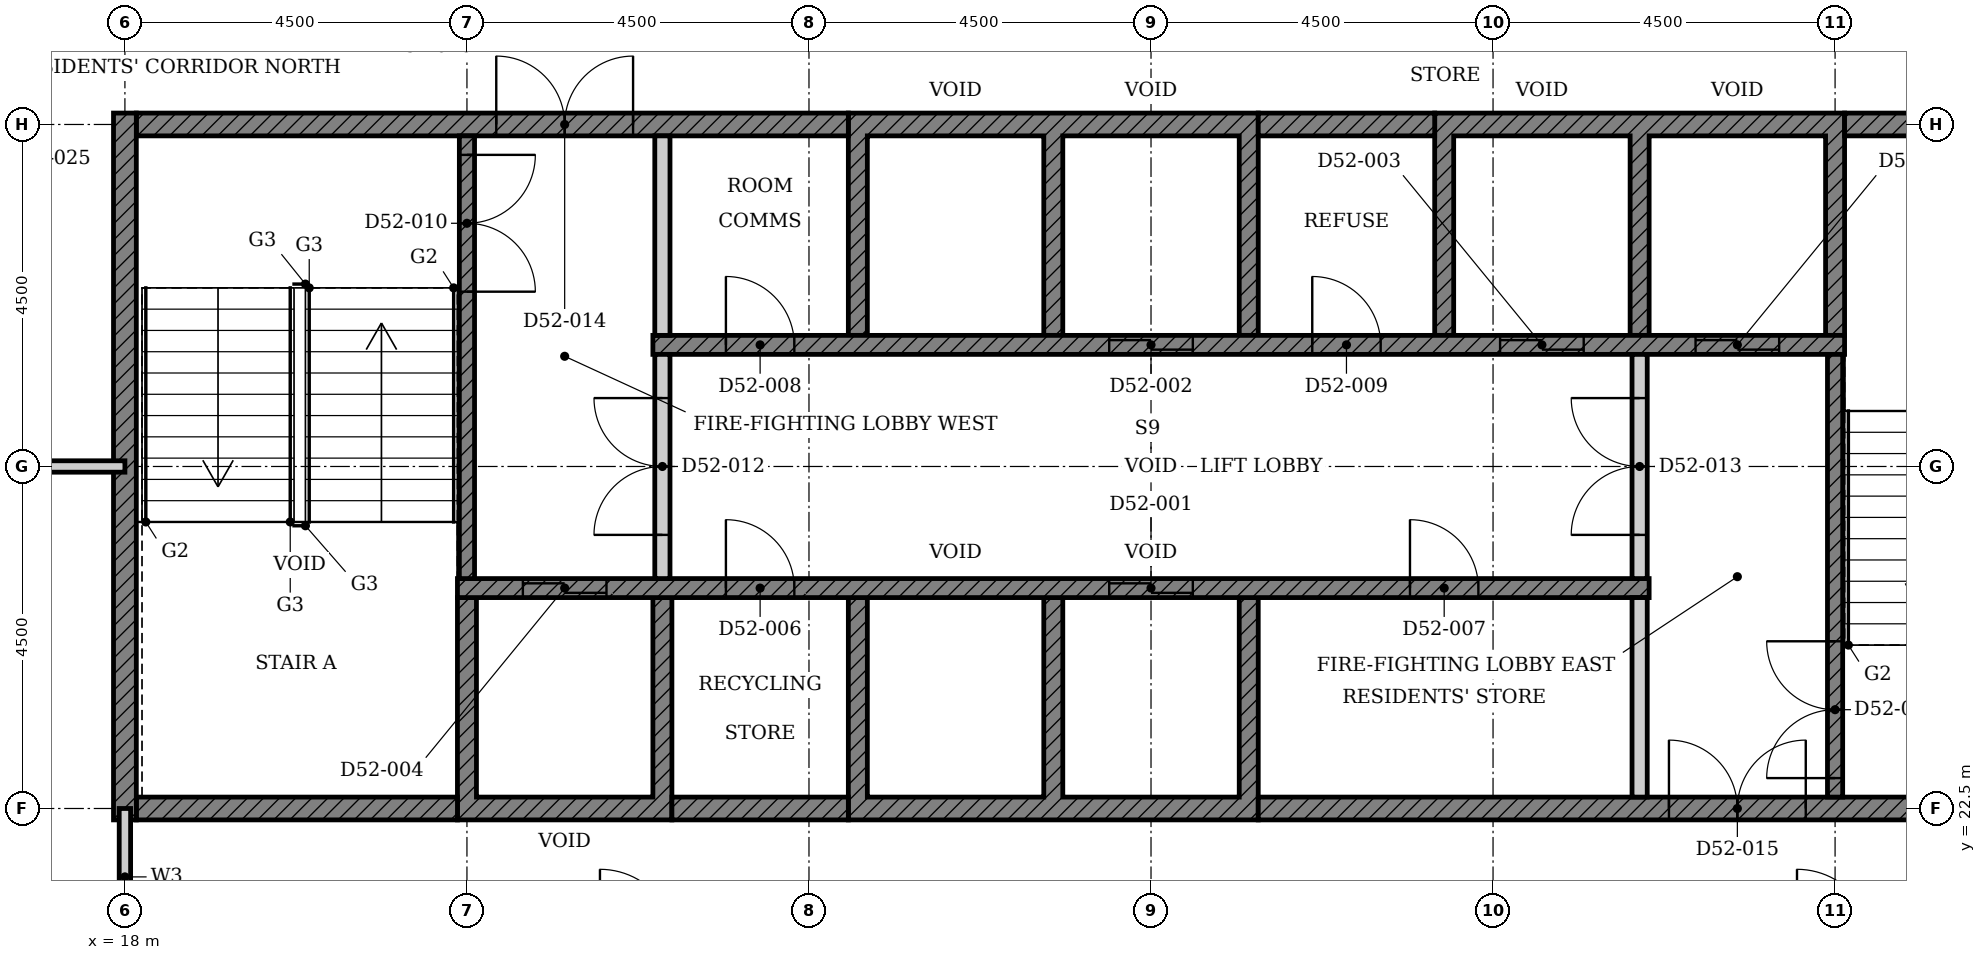
"""IFC4 building model, lengths in metres.
Left out: names, types, materials, properties, quantities, classifications, styles, units other than length and angle.
Written with IfcOpenShell. Run it as: python <this file> out.ifc"""

import sys

from ifc_helpers import new_model, si_unit, direction, frame, frame_2d, origin, place, context, subcontext, project, spatial, polyline, rectangle, outline, extrude, element, fill, save


model = new_model("IFC4")
c1 = context("Model", 3, precision=1e-05, world=origin(), true_north=direction((0.0, 1.0)))
c2 = subcontext(c1, "Body", "Model", "MODEL_VIEW")
j1 = project(units=[si_unit("LENGTHUNIT", "METRE"), si_unit("PLANEANGLEUNIT", "RADIAN")], contexts=[c1])
p1 = place(None, origin())
s1 = spatial("IfcSite", under=j1, at=p1, CompositionType="ELEMENT")
p2 = place(p1, origin())
s2 = spatial("IfcBuilding", under=s1, at=p2, CompositionType="ELEMENT")
p3 = place(p2, frame((0.0, 0.0, 207.2)))
s3 = spatial("IfcBuildingStorey", under=s2, at=p3, CompositionType="ELEMENT", Elevation=207.2)
p4 = place(p3, origin())
e1 = element("IfcWall", 1, at=p4, inside=s3, PredefinedType="SHEAR", context=c2, shape_type="SweptSolid", body=[
    extrude(outline(polyline([(22.375, 22.35), (25.197, 22.35), (25.197, 25.275), (24.947, 25.275), (24.947, 22.65), (22.625, 22.65), (22.625, 25.275), (22.375, 25.275), (22.375, 22.35)])), origin(), (0.0, 0.0, 1.0), 3.4),
])
p5 = place(p3, origin())
e2 = element("IfcWall", 2, at=p5, inside=s3, PredefinedType="SHEAR", context=c2, shape_type="SweptSolid", body=[
    extrude(outline(polyline([(27.518, 22.35), (32.911, 22.35), (32.911, 25.275), (32.661, 25.275), (32.661, 22.65), (30.339, 22.65), (30.339, 25.275), (30.089, 25.275), (30.089, 22.65), (27.768, 22.65), (27.768, 25.275), (27.518, 25.275), (27.518, 22.35)])), origin(), (0.0, 0.0, 1.0), 3.4),
])
p6 = place(p3, origin())
e3 = element("IfcWall", 3, at=p6, inside=s3, PredefinedType="SHEAR", context=c2, shape_type="SweptSolid", body=[
    extrude(outline(polyline([(27.518, 28.725), (27.768, 28.725), (27.768, 31.35), (30.089, 31.35), (30.089, 28.725), (30.339, 28.725), (30.339, 31.35), (32.661, 31.35), (32.661, 28.725), (32.911, 28.725), (32.911, 31.65), (27.518, 31.65), (27.518, 28.725)])), origin(), (0.0, 0.0, 1.0), 3.4),
])
p7 = place(p3, origin())
e4 = element("IfcWall", 4, at=p7, inside=s3, PredefinedType="SHEAR", context=c2, shape_type="SweptSolid", body=[
    extrude(outline(polyline([(35.232, 28.725), (35.482, 28.725), (35.482, 31.35), (37.803, 31.35), (37.803, 28.725), (38.053, 28.725), (38.053, 31.35), (40.375, 31.35), (40.375, 28.725), (40.625, 28.725), (40.625, 31.65), (35.232, 31.65), (35.232, 28.725)])), origin(), (0.0, 0.0, 1.0), 3.4),
])
p8 = place(p3, frame((18.15, 22.5, 0.0), z_axis=(0.0, 0.0, 1.0), x_axis=(1.0, 0.0, 0.0)))
e5 = element("IfcWall", 5, at=p8, inside=s3, PredefinedType="SHEAR", context=c2, shape_type="SweptSolid", body=[
    extrude(rectangle(XDim=4.225, YDim=0.3, at=frame_2d((2.113, 0.0))), origin(), (0.0, 0.0, 1.0), 3.4),
])
p9 = place(p3, frame((25.197, 22.5, 0.0), z_axis=(0.0, 0.0, 1.0), x_axis=(1.0, 0.0, 0.0)))
e6 = element("IfcWall", 6, at=p9, inside=s3, PredefinedType="SHEAR", context=c2, shape_type="SweptSolid", body=[
    extrude(rectangle(XDim=2.321, YDim=0.3, at=frame_2d((1.161, 0.0))), origin(), (0.0, 0.0, 1.0), 3.4),
])
p10 = place(p3, frame((32.911, 22.5, 0.0), z_axis=(0.0, 0.0, 1.0), x_axis=(1.0, 0.0, 0.0)))
e7 = element("IfcWall", 7, at=p10, inside=s3, PredefinedType="SHEAR", context=c2, shape_type="SweptSolid", body=[
    extrude(rectangle(XDim=11.939, YDim=0.3, at=frame_2d((5.97, 0.0))), origin(), (0.0, 0.0, 1.0), 3.4),
])
p11 = place(p10, frame((5.404, 0.0, 0.0)))
e8 = element("IfcOpeningElement", 8, at=p11, cuts=e7, PredefinedType="OPENING", context=c2, shape_type="SweptSolid", body=[
    extrude(rectangle(XDim=1.8, YDim=2.1, at=frame_2d((0.9, 1.05))), frame((0.0, 0.16, 0.0), z_axis=(0.0, -1.0, 0.0), x_axis=(1.0, 0.0, 0.0)), (0.0, 0.0, 1.0), 0.32),
])
p12 = place(p3, frame((18.15, 31.5, 0.0), z_axis=(0.0, 0.0, 1.0), x_axis=(1.0, 0.0, 0.0)))
e9 = element("IfcWall", 9, at=p12, inside=s3, PredefinedType="SHEAR", context=c2, shape_type="SweptSolid", body=[
    extrude(rectangle(XDim=9.368, YDim=0.3, at=frame_2d((4.684, 0.0))), origin(), (0.0, 0.0, 1.0), 3.4),
])
p13 = place(p12, frame((4.736, 0.0, 0.0)))
e10 = element("IfcOpeningElement", 10, at=p13, cuts=e9, PredefinedType="OPENING", context=c2, shape_type="SweptSolid", body=[
    extrude(rectangle(XDim=1.8, YDim=2.1, at=frame_2d((0.9, 1.05))), frame((0.0, 0.16, 0.0), z_axis=(0.0, -1.0, 0.0), x_axis=(1.0, 0.0, 0.0)), (0.0, 0.0, 1.0), 0.32),
])
p14 = place(p3, frame((32.911, 31.5, 0.0), z_axis=(0.0, 0.0, 1.0), x_axis=(1.0, 0.0, 0.0)))
e11 = element("IfcWall", 11, at=p14, inside=s3, PredefinedType="SHEAR", context=c2, shape_type="SweptSolid", body=[
    extrude(rectangle(XDim=2.322, YDim=0.3, at=frame_2d((1.161, 0.0))), origin(), (0.0, 0.0, 1.0), 3.4),
])
p15 = place(p3, frame((40.625, 31.5, 0.0), z_axis=(0.0, 0.0, 1.0), x_axis=(1.0, 0.0, 0.0)))
e12 = element("IfcWall", 12, at=p15, inside=s3, PredefinedType="SHEAR", context=c2, shape_type="SweptSolid", body=[
    extrude(rectangle(XDim=4.225, YDim=0.3, at=frame_2d((2.113, 0.0))), origin(), (0.0, 0.0, 1.0), 3.4),
])
p16 = place(p3, frame((18.0, 22.35, 0.0), z_axis=(0.0, 0.0, 1.0), x_axis=(0.0, 1.0, 0.0)))
e13 = element("IfcWall", 13, at=p16, inside=s3, PredefinedType="SHEAR", context=c2, shape_type="SweptSolid", body=[
    extrude(rectangle(XDim=9.3, YDim=0.3, at=frame_2d((4.65, 0.0))), origin(), (0.0, 0.0, 1.0), 3.4),
])
p17 = place(p3, frame((22.375, 25.4, 0.0), z_axis=(0.0, 0.0, 1.0), x_axis=(1.0, 0.0, 0.0)))
e14 = element("IfcWall", 14, at=p17, inside=s3, PredefinedType="SHEAR", context=c2, shape_type="SweptSolid", body=[
    extrude(rectangle(XDim=15.678, YDim=0.25, at=frame_2d((7.839, 0.0))), origin(), (0.0, 0.0, 1.0), 3.4),
])
p18 = place(p17, frame((8.575, 0.0, 0.0)))
e15 = element("IfcOpeningElement", 15, at=p18, cuts=e14, PredefinedType="OPENING", context=c2, shape_type="SweptSolid", body=[
    extrude(rectangle(XDim=1.1, YDim=2.1, at=frame_2d((0.55, 1.05))), frame((0.0, 0.135, 0.0), z_axis=(0.0, -1.0, 0.0), x_axis=(1.0, 0.0, 0.0)), (0.0, 0.0, 1.0), 0.27),
])
p19 = place(p17, frame((0.861, 0.0, 0.0)))
e16 = element("IfcOpeningElement", 16, at=p19, cuts=e14, PredefinedType="OPENING", context=c2, shape_type="SweptSolid", body=[
    extrude(rectangle(XDim=1.1, YDim=2.1, at=frame_2d((0.55, 1.05))), frame((0.0, 0.135, 0.0), z_axis=(0.0, -1.0, 0.0), x_axis=(1.0, 0.0, 0.0)), (0.0, 0.0, 1.0), 0.27),
])
p20 = place(p17, frame((3.532, 0.0, 0.0)))
e17 = element("IfcOpeningElement", 17, at=p20, cuts=e14, PredefinedType="OPENING", context=c2, shape_type="SweptSolid", body=[
    extrude(rectangle(XDim=0.9, YDim=2.1, at=frame_2d((0.45, 1.05))), frame((0.0, 0.135, 0.0), z_axis=(0.0, -1.0, 0.0), x_axis=(1.0, 0.0, 0.0)), (0.0, 0.0, 1.0), 0.27),
])
p21 = place(p17, frame((12.532, 0.0, 0.0)))
e18 = element("IfcOpeningElement", 18, at=p21, cuts=e14, PredefinedType="OPENING", context=c2, shape_type="SweptSolid", body=[
    extrude(rectangle(XDim=0.9, YDim=2.1, at=frame_2d((0.45, 1.05))), frame((0.0, 0.135, 0.0), z_axis=(0.0, -1.0, 0.0), x_axis=(1.0, 0.0, 0.0)), (0.0, 0.0, 1.0), 0.27),
])
p22 = place(p3, frame((24.947, 28.6, 0.0), z_axis=(0.0, 0.0, 1.0), x_axis=(1.0, 0.0, 0.0)))
e19 = element("IfcWall", 19, at=p22, inside=s3, PredefinedType="SHEAR", context=c2, shape_type="SweptSolid", body=[
    extrude(rectangle(XDim=15.678, YDim=0.25, at=frame_2d((7.839, 0.0))), origin(), (0.0, 0.0, 1.0), 3.4),
])
p23 = place(p22, frame((6.004, 0.0, 0.0)))
e20 = element("IfcOpeningElement", 20, at=p23, cuts=e19, PredefinedType="OPENING", context=c2, shape_type="SweptSolid", body=[
    extrude(rectangle(XDim=1.1, YDim=2.1, at=frame_2d((0.55, 1.05))), frame((0.0, 0.135, 0.0), z_axis=(0.0, -1.0, 0.0), x_axis=(1.0, 0.0, 0.0)), (0.0, 0.0, 1.0), 0.27),
])
p24 = place(p22, frame((11.146, 0.0, 0.0)))
e21 = element("IfcOpeningElement", 21, at=p24, cuts=e19, PredefinedType="OPENING", context=c2, shape_type="SweptSolid", body=[
    extrude(rectangle(XDim=1.1, YDim=2.1, at=frame_2d((0.55, 1.05))), frame((0.0, 0.135, 0.0), z_axis=(0.0, -1.0, 0.0), x_axis=(1.0, 0.0, 0.0)), (0.0, 0.0, 1.0), 0.27),
])
p25 = place(p22, frame((13.718, 0.0, 0.0)))
e22 = element("IfcOpeningElement", 22, at=p25, cuts=e19, PredefinedType="OPENING", context=c2, shape_type="SweptSolid", body=[
    extrude(rectangle(XDim=1.1, YDim=2.1, at=frame_2d((0.55, 1.05))), frame((0.0, 0.135, 0.0), z_axis=(0.0, -1.0, 0.0), x_axis=(1.0, 0.0, 0.0)), (0.0, 0.0, 1.0), 0.27),
])
p26 = place(p22, frame((0.961, 0.0, 0.0)))
e23 = element("IfcOpeningElement", 23, at=p26, cuts=e19, PredefinedType="OPENING", context=c2, shape_type="SweptSolid", body=[
    extrude(rectangle(XDim=0.9, YDim=2.1, at=frame_2d((0.45, 1.05))), frame((0.0, 0.135, 0.0), z_axis=(0.0, -1.0, 0.0), x_axis=(1.0, 0.0, 0.0)), (0.0, 0.0, 1.0), 0.27),
])
p27 = place(p22, frame((8.675, 0.0, 0.0)))
e24 = element("IfcOpeningElement", 24, at=p27, cuts=e19, PredefinedType="OPENING", context=c2, shape_type="SweptSolid", body=[
    extrude(rectangle(XDim=0.9, YDim=2.1, at=frame_2d((0.45, 1.05))), frame((0.0, 0.135, 0.0), z_axis=(0.0, -1.0, 0.0), x_axis=(1.0, 0.0, 0.0)), (0.0, 0.0, 1.0), 0.27),
])
for number, where, z_axis, x_axis in (
    (25, (37.928, 22.65, 0.0), (0.0, 0.0, 1.0), (0.0, 1.0, 0.0)),
    (26, (25.072, 28.725, 0.0), (0.0, 0.0, 1.0), (0.0, 1.0, 0.0)),
):
    element("IfcWall", number, at=place(p3, frame(where, z_axis=z_axis, x_axis=x_axis)), inside=s3, PredefinedType="PARTITIONING", context=c2, shape_type="SweptSolid", body=[
        extrude(rectangle(XDim=2.625, YDim=0.2, at=frame_2d((1.312, 0.0))), origin(), (0.0, 0.0, 1.0), 3.4),
    ])
p28 = place(p3, frame((22.5, 31.35, 0.0), z_axis=(0.0, 0.0, 1.0), x_axis=(0.0, -1.0, 0.0)))
e27 = element("IfcWall", 27, at=p28, inside=s3, PredefinedType="SHEAR", context=c2, shape_type="SweptSolid", body=[
    extrude(rectangle(XDim=5.825, YDim=0.2, at=frame_2d((2.913, 0.0))), origin(), (0.0, 0.0, 1.0), 3.4),
])
p29 = place(p28, frame((0.25, 0.0, 0.0)))
e28 = element("IfcOpeningElement", 28, at=p29, cuts=e27, PredefinedType="OPENING", context=c2, shape_type="SweptSolid", body=[
    extrude(rectangle(XDim=1.8, YDim=2.1, at=frame_2d((0.9, 1.05))), frame((0.0, 0.11, 0.0), z_axis=(0.0, -1.0, 0.0), x_axis=(1.0, 0.0, 0.0)), (0.0, 0.0, 1.0), 0.22),
])
p30 = place(p3, frame((40.5, 22.65, 0.0), z_axis=(0.0, 0.0, 1.0), x_axis=(0.0, 1.0, 0.0)))
e29 = element("IfcWall", 29, at=p30, inside=s3, PredefinedType="SHEAR", context=c2, shape_type="SweptSolid", body=[
    extrude(rectangle(XDim=5.825, YDim=0.2, at=frame_2d((2.913, 0.0))), origin(), (0.0, 0.0, 1.0), 3.4),
])
p31 = place(p30, frame((0.25, 0.0, 0.0)))
e30 = element("IfcOpeningElement", 30, at=p31, cuts=e29, PredefinedType="OPENING", context=c2, shape_type="SweptSolid", body=[
    extrude(rectangle(XDim=1.8, YDim=2.1, at=frame_2d((0.9, 1.05))), frame((0.0, 0.11, 0.0), z_axis=(0.0, -1.0, 0.0), x_axis=(1.0, 0.0, 0.0)), (0.0, 0.0, 1.0), 0.22),
])
p32 = place(p3, frame((25.072, 25.525, 0.0), z_axis=(0.0, 0.0, 1.0), x_axis=(0.0, 1.0, 0.0)))
e31 = element("IfcWall", 31, at=p32, inside=s3, PredefinedType="PARTITIONING", context=c2, shape_type="SweptSolid", body=[
    extrude(rectangle(XDim=2.95, YDim=0.2, at=frame_2d((1.475, 0.0))), origin(), (0.0, 0.0, 1.0), 3.4),
])
p33 = place(p32, frame((0.575, 0.0, 0.0)))
e32 = element("IfcOpeningElement", 32, at=p33, cuts=e31, PredefinedType="OPENING", context=c2, shape_type="SweptSolid", body=[
    extrude(rectangle(XDim=1.8, YDim=2.1, at=frame_2d((0.9, 1.05))), frame((0.0, 0.11, 0.0), z_axis=(0.0, -1.0, 0.0), x_axis=(1.0, 0.0, 0.0)), (0.0, 0.0, 1.0), 0.22),
])
p34 = place(p3, frame((37.928, 25.525, 0.0), z_axis=(0.0, 0.0, 1.0), x_axis=(0.0, 1.0, 0.0)))
e33 = element("IfcWall", 33, at=p34, inside=s3, PredefinedType="PARTITIONING", context=c2, shape_type="SweptSolid", body=[
    extrude(rectangle(XDim=2.95, YDim=0.2, at=frame_2d((1.475, 0.0))), origin(), (0.0, 0.0, 1.0), 3.4),
])
p35 = place(p34, frame((0.575, 0.0, 0.0)))
e34 = element("IfcOpeningElement", 34, at=p35, cuts=e33, PredefinedType="OPENING", context=c2, shape_type="SweptSolid", body=[
    extrude(rectangle(XDim=1.8, YDim=2.1, at=frame_2d((0.9, 1.05))), frame((0.0, 0.11, 0.0), z_axis=(0.0, -1.0, 0.0), x_axis=(1.0, 0.0, 0.0)), (0.0, 0.0, 1.0), 0.22),
])
p36 = place(p3, frame((4.5, 27.0, 0.0), z_axis=(0.0, 0.0, 1.0), x_axis=(1.0, 0.0, 0.0)))
e35 = element("IfcWall", 35, at=p36, inside=s3, PredefinedType="PARTITIONING", context=c2, shape_type="SweptSolid", body=[
    extrude(rectangle(XDim=13.5, YDim=0.15, at=frame_2d((6.75, 0.0))), origin(), (0.0, 0.0, 1.0), 2.68),
])
p37 = place(p36, frame((5.35, 0.0, 0.0)))
e36 = element("IfcOpeningElement", 36, at=p37, cuts=e35, PredefinedType="OPENING", context=c2, shape_type="SweptSolid", body=[
    extrude(rectangle(XDim=1.0, YDim=2.1, at=frame_2d((0.5, 1.05))), frame((0.0, 0.085, 0.0), z_axis=(0.0, -1.0, 0.0), x_axis=(1.0, 0.0, 0.0)), (0.0, 0.0, 1.0), 0.17),
])
p38 = place(p3, frame((18.0, 20.7, 0.0), z_axis=(0.0, 0.0, 1.0), x_axis=(0.0, 1.0, 0.0)))
e37 = element("IfcWall", 37, at=p38, inside=s3, PredefinedType="PARTITIONING", context=c2, shape_type="SweptSolid", body=[
    extrude(rectangle(XDim=1.8, YDim=0.15, at=frame_2d((0.9, 0.0))), origin(), (0.0, 0.0, 1.0), 3.4),
])
p39 = place(p18, origin())
e38 = element("IfcDoor", 38, at=p39, inside=s3, OperationType="DOUBLE_DOOR_SLIDING", PredefinedType="DOOR", context=c2, shape_type="SweptSolid", body=[
    extrude(rectangle(XDim=1.1, YDim=2.1, at=frame_2d((0.55, 1.05))), frame((0.0, 0.025, 0.0), z_axis=(0.0, -1.0, 0.0), x_axis=(1.0, 0.0, 0.0)), (0.0, 0.0, 1.0), 0.05),
])
fill(e15, e38)
p40 = place(p23, origin())
e39 = element("IfcDoor", 39, at=p40, inside=s3, OperationType="DOUBLE_DOOR_SLIDING", PredefinedType="DOOR", context=c2, shape_type="SweptSolid", body=[
    extrude(rectangle(XDim=1.1, YDim=2.1, at=frame_2d((0.55, 1.05))), frame((0.0, 0.025, 0.0), z_axis=(0.0, -1.0, 0.0), x_axis=(1.0, 0.0, 0.0)), (0.0, 0.0, 1.0), 0.05),
])
fill(e20, e39)
p41 = place(p24, origin())
e40 = element("IfcDoor", 40, at=p41, inside=s3, OperationType="DOUBLE_DOOR_SLIDING", PredefinedType="DOOR", context=c2, shape_type="SweptSolid", body=[
    extrude(rectangle(XDim=1.1, YDim=2.1, at=frame_2d((0.55, 1.05))), frame((0.0, 0.025, 0.0), z_axis=(0.0, -1.0, 0.0), x_axis=(1.0, 0.0, 0.0)), (0.0, 0.0, 1.0), 0.05),
])
fill(e21, e40)
p42 = place(p19, origin())
e41 = element("IfcDoor", 41, at=p42, inside=s3, OperationType="DOUBLE_DOOR_SLIDING", PredefinedType="DOOR", context=c2, shape_type="SweptSolid", body=[
    extrude(rectangle(XDim=1.1, YDim=2.1, at=frame_2d((0.55, 1.05))), frame((0.0, 0.025, 0.0), z_axis=(0.0, -1.0, 0.0), x_axis=(1.0, 0.0, 0.0)), (0.0, 0.0, 1.0), 0.05),
])
fill(e16, e41)
p43 = place(p25, origin())
e42 = element("IfcDoor", 42, at=p43, inside=s3, OperationType="DOUBLE_DOOR_SLIDING", PredefinedType="DOOR", context=c2, shape_type="SweptSolid", body=[
    extrude(rectangle(XDim=1.1, YDim=2.1, at=frame_2d((0.55, 1.05))), frame((0.0, 0.025, 0.0), z_axis=(0.0, -1.0, 0.0), x_axis=(1.0, 0.0, 0.0)), (0.0, 0.0, 1.0), 0.05),
])
fill(e22, e42)
p44 = place(p20, origin())
e43 = element("IfcDoor", 43, at=p44, inside=s3, OperationType="SINGLE_SWING_LEFT", PredefinedType="DOOR", context=c2, shape_type="SweptSolid", body=[
    extrude(rectangle(XDim=0.9, YDim=2.1, at=frame_2d((0.45, 1.05))), frame((0.0, 0.025, 0.0), z_axis=(0.0, -1.0, 0.0), x_axis=(1.0, 0.0, 0.0)), (0.0, 0.0, 1.0), 0.05),
])
fill(e17, e43)
p45 = place(p21, origin())
e44 = element("IfcDoor", 44, at=p45, inside=s3, OperationType="SINGLE_SWING_LEFT", PredefinedType="DOOR", context=c2, shape_type="SweptSolid", body=[
    extrude(rectangle(XDim=0.9, YDim=2.1, at=frame_2d((0.45, 1.05))), frame((0.0, 0.025, 0.0), z_axis=(0.0, -1.0, 0.0), x_axis=(1.0, 0.0, 0.0)), (0.0, 0.0, 1.0), 0.05),
])
fill(e18, e44)
p46 = place(p26, origin())
e45 = element("IfcDoor", 45, at=p46, inside=s3, OperationType="SINGLE_SWING_LEFT", PredefinedType="DOOR", context=c2, shape_type="SweptSolid", body=[
    extrude(rectangle(XDim=0.9, YDim=2.1, at=frame_2d((0.45, 1.05))), frame((0.0, 0.025, 0.0), z_axis=(0.0, -1.0, 0.0), x_axis=(1.0, 0.0, 0.0)), (0.0, 0.0, 1.0), 0.05),
])
fill(e23, e45)
p47 = place(p27, origin())
e46 = element("IfcDoor", 46, at=p47, inside=s3, OperationType="SINGLE_SWING_LEFT", PredefinedType="DOOR", context=c2, shape_type="SweptSolid", body=[
    extrude(rectangle(XDim=0.9, YDim=2.1, at=frame_2d((0.45, 1.05))), frame((0.0, 0.025, 0.0), z_axis=(0.0, -1.0, 0.0), x_axis=(1.0, 0.0, 0.0)), (0.0, 0.0, 1.0), 0.05),
])
fill(e24, e46)
p48 = place(p29, origin())
e47 = element("IfcDoor", 47, at=p48, inside=s3, OperationType="DOUBLE_DOOR_SINGLE_SWING", PredefinedType="DOOR", context=c2, shape_type="SweptSolid", body=[
    extrude(rectangle(XDim=1.8, YDim=2.1, at=frame_2d((0.9, 1.05))), frame((0.0, 0.025, 0.0), z_axis=(0.0, -1.0, 0.0), x_axis=(1.0, 0.0, 0.0)), (0.0, 0.0, 1.0), 0.05),
])
fill(e28, e47)
p49 = place(p31, origin())
e48 = element("IfcDoor", 48, at=p49, inside=s3, OperationType="DOUBLE_DOOR_SINGLE_SWING", PredefinedType="DOOR", context=c2, shape_type="SweptSolid", body=[
    extrude(rectangle(XDim=1.8, YDim=2.1, at=frame_2d((0.9, 1.05))), frame((0.0, 0.025, 0.0), z_axis=(0.0, -1.0, 0.0), x_axis=(1.0, 0.0, 0.0)), (0.0, 0.0, 1.0), 0.05),
])
fill(e30, e48)
p50 = place(p33, origin())
e49 = element("IfcDoor", 49, at=p50, inside=s3, OperationType="DOUBLE_DOOR_SINGLE_SWING", PredefinedType="DOOR", context=c2, shape_type="SweptSolid", body=[
    extrude(rectangle(XDim=1.8, YDim=2.1, at=frame_2d((0.9, 1.05))), frame((0.0, 0.025, 0.0), z_axis=(0.0, -1.0, 0.0), x_axis=(1.0, 0.0, 0.0)), (0.0, 0.0, 1.0), 0.05),
])
fill(e32, e49)
p51 = place(p35, origin())
e50 = element("IfcDoor", 50, at=p51, inside=s3, OperationType="DOUBLE_DOOR_SINGLE_SWING", PredefinedType="DOOR", context=c2, shape_type="SweptSolid", body=[
    extrude(rectangle(XDim=1.8, YDim=2.1, at=frame_2d((0.9, 1.05))), frame((0.0, 0.025, 0.0), z_axis=(0.0, -1.0, 0.0), x_axis=(1.0, 0.0, 0.0)), (0.0, 0.0, 1.0), 0.05),
])
fill(e34, e50)
p52 = place(p13, origin())
e51 = element("IfcDoor", 51, at=p52, inside=s3, OperationType="DOUBLE_DOOR_SINGLE_SWING", PredefinedType="DOOR", context=c2, shape_type="SweptSolid", body=[
    extrude(rectangle(XDim=1.8, YDim=2.1, at=frame_2d((0.9, 1.05))), frame((0.0, 0.025, 0.0), z_axis=(0.0, -1.0, 0.0), x_axis=(1.0, 0.0, 0.0)), (0.0, 0.0, 1.0), 0.05),
])
fill(e10, e51)
p53 = place(p11, origin())
e52 = element("IfcDoor", 52, at=p53, inside=s3, OperationType="DOUBLE_DOOR_SINGLE_SWING", PredefinedType="DOOR", context=c2, shape_type="SweptSolid", body=[
    extrude(rectangle(XDim=1.8, YDim=2.1, at=frame_2d((0.9, 1.05))), frame((0.0, 0.025, 0.0), z_axis=(0.0, -1.0, 0.0), x_axis=(1.0, 0.0, 0.0)), (0.0, 0.0, 1.0), 0.05),
])
fill(e8, e52)
save(model, sys.argv[1])
